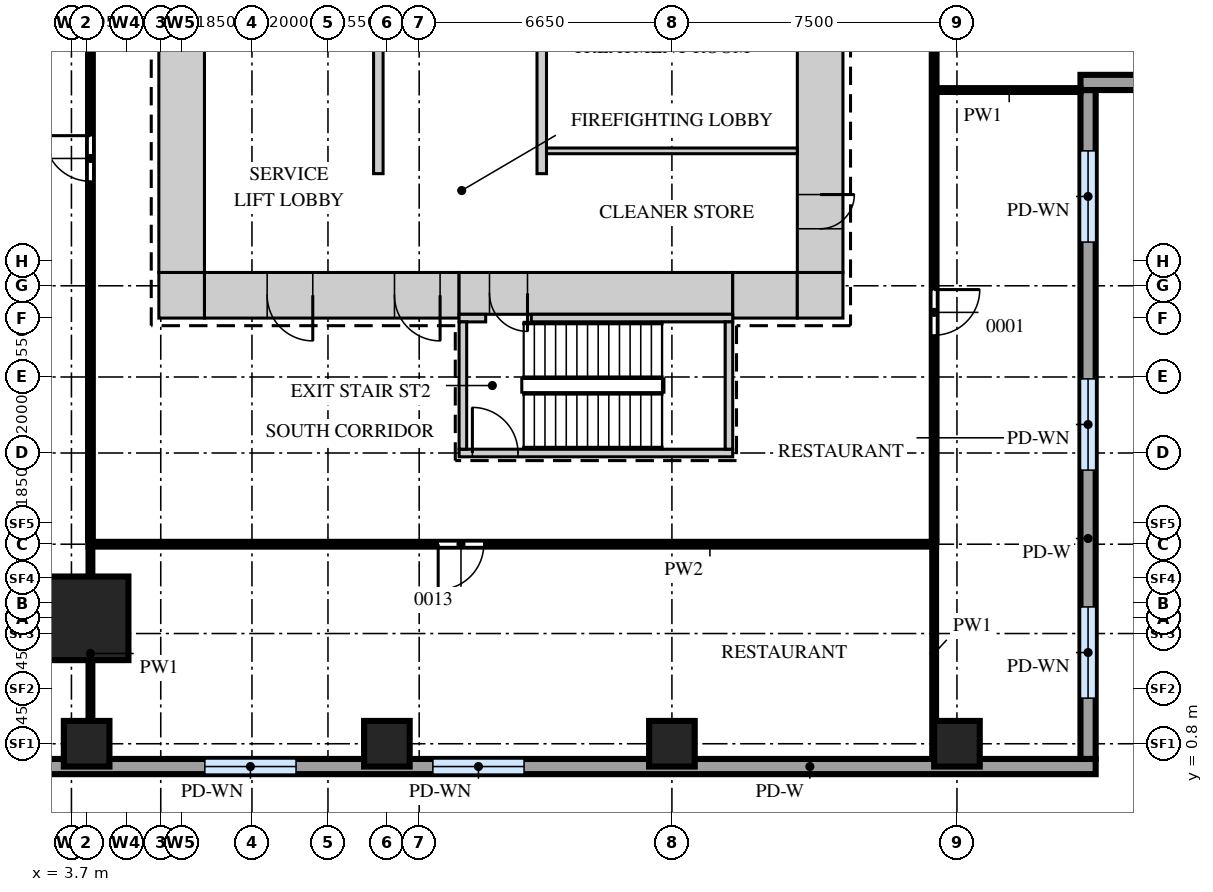
"""IFC4 building model, lengths in metres.
Left out: names, types, materials, properties, quantities, classifications, styles, units other than length and angle.
Written with IfcOpenShell. Run it as: python <this file> out.ifc"""

import sys

from ifc_helpers import new_model, si_unit, direction, frame, frame_2d, origin, origin_2d, place, context, subcontext, project, spatial, rectangle, extrude, source, transform, mapped, element, fill, save


model = new_model("IFC4")
c1 = context("Model", 3, precision=1e-05, world=origin(), true_north=direction((0.0, 1.0)))
c2 = subcontext(c1, "Body", "Model", "MODEL_VIEW")
j1 = project(units=[si_unit("LENGTHUNIT", "METRE"), si_unit("PLANEANGLEUNIT", "RADIAN")], contexts=[c1])
p1 = place(None, origin())
s1 = spatial("IfcSite", under=j1, at=p1, CompositionType="ELEMENT")
p2 = place(p1, origin())
s2 = spatial("IfcBuilding", under=s1, at=p2, CompositionType="ELEMENT")
p3 = place(p2, frame((0.0, 0.0, 18.5)))
s3 = spatial("IfcBuildingStorey", under=s2, at=p3, CompositionType="ELEMENT", Elevation=18.5)
m1 = source(origin(), c2, "Body", "SweptSolid", [
    extrude(rectangle(XDim=6.7, YDim=1.2, at=frame_2d((3.35, 0.0))), origin(), (0.0, 0.0, 1.0), 4.7),
])
p4 = place(p3, frame((7.2, 12.6, 0.0), z_axis=(0.0, 0.0, 1.0), x_axis=(1.0, 0.0, 0.0)))
e1 = element("IfcWall", 1, at=p4, inside=s3, PredefinedType="SHEAR", context=c2, shape_type="MappedRepresentation", body=[
    mapped(m1, transform((0.0, 0.0, 0.0))),
])
m2 = source(origin(), c2, "Body", "SweptSolid", [
    extrude(rectangle(XDim=1.2, YDim=2.1, at=frame_2d((0.6, 1.05))), frame((0.0, 0.61, 0.0), z_axis=(0.0, -1.0, 0.0), x_axis=(1.0, 0.0, 0.0)), (0.0, 0.0, 1.0), 1.22),
])
p5 = place(p4, frame((5.0, 0.0, 0.0)))
e2 = element("IfcOpeningElement", 2, at=p5, cuts=e1, PredefinedType="OPENING", context=c2, shape_type="MappedRepresentation", body=[
    mapped(m2, transform((0.0, 0.0, 0.0))),
])
p6 = place(p4, frame((1.65, 0.0, 0.0)))
e3 = element("IfcOpeningElement", 3, at=p6, cuts=e1, PredefinedType="OPENING", context=c2, shape_type="MappedRepresentation", body=[
    mapped(m2, transform((0.0, 0.0, 0.0))),
])
m3 = source(origin(), c2, "Body", "SweptSolid", [
    extrude(rectangle(XDim=7.2, YDim=1.1, at=frame_2d((3.6, 0.0))), origin(), (0.0, 0.0, 1.0), 4.7),
])
p7 = place(p3, frame((13.9, 12.65, 0.0), z_axis=(0.0, 0.0, 1.0), x_axis=(1.0, 0.0, 0.0)))
e4 = element("IfcWall", 4, at=p7, inside=s3, PredefinedType="SHEAR", context=c2, shape_type="MappedRepresentation", body=[
    mapped(m3, transform((0.0, 0.0, 0.0))),
])
m4 = source(origin(), c2, "Body", "SweptSolid", [
    extrude(rectangle(XDim=1.0, YDim=2.1, at=frame_2d((0.5, 1.05))), frame((0.0, 0.56, 0.0), z_axis=(0.0, -1.0, 0.0), x_axis=(1.0, 0.0, 0.0)), (0.0, 0.0, 1.0), 1.12),
])
p8 = place(p7, frame((0.8, 0.0, 0.0)))
e5 = element("IfcOpeningElement", 5, at=p8, cuts=e4, PredefinedType="OPENING", context=c2, shape_type="MappedRepresentation", body=[
    mapped(m4, transform((0.0, 0.0, 0.0))),
])
m5 = source(origin(), c2, "Body", "SweptSolid", [
    extrude(rectangle(XDim=1.7, YDim=1.2, at=frame_2d((0.85, 0.0))), origin(), (0.0, 0.0, 1.0), 4.7),
])
p9 = place(p3, frame((21.1, 12.6, 0.0), z_axis=(0.0, 0.0, 1.0), x_axis=(1.0, 0.0, 0.0)))
e6 = element("IfcWall", 6, at=p9, inside=s3, PredefinedType="SHEAR", context=c2, shape_type="MappedRepresentation", body=[
    mapped(m5, transform((0.0, 0.0, 0.0))),
])
m6 = source(origin(), c2, "Body", "SweptSolid", [
    extrude(rectangle(XDim=1.2, YDim=1.2, at=frame_2d((0.6, 0.0))), origin(), (0.0, 0.0, 1.0), 4.7),
])
for number, where, z_axis, x_axis in (
    (7, (22.8, 12.6, 0.0), (0.0, 0.0, 1.0), (1.0, 0.0, 0.0)),
    (8, (6.0, 12.6, 0.0), (0.0, 0.0, 1.0), (1.0, 0.0, 0.0)),
):
    element("IfcWall", number, at=place(p3, frame(where, z_axis=z_axis, x_axis=x_axis)), inside=s3, PredefinedType="SHEAR", context=c2, shape_type="MappedRepresentation", body=[
        mapped(m6, transform((0.0, 0.0, 0.0))),
    ])
m7 = source(origin(), c2, "Body", "SweptSolid", [
    extrude(rectangle(XDim=27.6, YDim=1.2, at=frame_2d((13.8, 0.0))), origin(), (0.0, 0.0, 1.0), 4.7),
])
p10 = place(p3, frame((23.4, 13.2, 0.0), z_axis=(0.0, 0.0, 1.0), x_axis=(0.0, 1.0, 0.0)))
e9 = element("IfcWall", 9, at=p10, inside=s3, PredefinedType="SHEAR", context=c2, shape_type="MappedRepresentation", body=[
    mapped(m7, transform((0.0, 0.0, 0.0))),
])
m8 = source(origin(), c2, "Body", "SweptSolid", [
    extrude(rectangle(XDim=1.8, YDim=2.1, at=frame_2d((0.9, 1.05))), frame((0.0, 0.61, 0.0), z_axis=(0.0, -1.0, 0.0), x_axis=(1.0, 0.0, 0.0)), (0.0, 0.0, 1.0), 1.22),
])
p11 = place(p10, frame((22.4, 0.0, 0.0)))
e10 = element("IfcOpeningElement", 10, at=p11, cuts=e9, PredefinedType="OPENING", context=c2, shape_type="MappedRepresentation", body=[
    mapped(m8, transform((0.0, 0.0, 0.0))),
])
p12 = place(p10, frame((14.4, 0.0, 0.0)))
e11 = element("IfcOpeningElement", 11, at=p12, cuts=e9, PredefinedType="OPENING", context=c2, shape_type="MappedRepresentation", body=[
    mapped(m2, transform((0.0, 0.0, 0.0))),
])
m9 = source(origin(), c2, "Body", "SweptSolid", [
    extrude(rectangle(XDim=0.9, YDim=2.1, at=frame_2d((0.45, 1.05))), frame((0.0, 0.61, 0.0), z_axis=(0.0, -1.0, 0.0), x_axis=(1.0, 0.0, 0.0)), (0.0, 0.0, 1.0), 1.22),
])
p13 = place(p10, frame((1.15, 0.0, 0.0)))
e12 = element("IfcOpeningElement", 12, at=p13, cuts=e9, PredefinedType="OPENING", context=c2, shape_type="MappedRepresentation", body=[
    mapped(m9, transform((0.0, 0.0, 0.0))),
])
p14 = place(p10, frame((6.0, 0.0, 0.0)))
e13 = element("IfcOpeningElement", 13, at=p14, cuts=e9, PredefinedType="OPENING", context=c2, shape_type="MappedRepresentation", body=[
    mapped(m9, transform((0.0, 0.0, 0.0))),
])
p15 = place(p3, frame((6.6, 13.2, 0.0), z_axis=(0.0, 0.0, 1.0), x_axis=(0.0, 1.0, 0.0)))
e14 = element("IfcWall", 14, at=p15, inside=s3, PredefinedType="SHEAR", context=c2, shape_type="MappedRepresentation", body=[
    mapped(m7, transform((0.0, 0.0, 0.0))),
])
m10 = source(origin(), c2, "Body", "SweptSolid", [
    extrude(rectangle(XDim=0.7, YDim=0.2, at=frame_2d((0.35, 0.0))), origin(), (0.0, 0.0, 1.0), 4.7),
])
p16 = place(p3, frame((13.9, 12.0, 0.0), z_axis=(0.0, 0.0, 1.0), x_axis=(1.0, 0.0, 0.0)))
e15 = element("IfcWall", 15, at=p16, inside=s3, PredefinedType="SHEAR", context=c2, shape_type="MappedRepresentation", body=[
    mapped(m10, transform((0.0, 0.0, 0.0))),
])
m11 = source(origin(), c2, "Body", "SweptSolid", [
    extrude(rectangle(XDim=5.3, YDim=0.2, at=frame_2d((2.65, 0.0))), origin(), (0.0, 0.0, 1.0), 4.7),
])
p17 = place(p3, frame((15.8, 12.0, 0.0), z_axis=(0.0, 0.0, 1.0), x_axis=(1.0, 0.0, 0.0)))
e16 = element("IfcWall", 16, at=p17, inside=s3, PredefinedType="SHEAR", context=c2, shape_type="MappedRepresentation", body=[
    mapped(m11, transform((0.0, 0.0, 0.0))),
])
m12 = source(origin(), c2, "Body", "SweptSolid", [
    extrude(rectangle(XDim=7.2, YDim=0.2, at=frame_2d((3.6, 0.0))), origin(), (0.0, 0.0, 1.0), 4.7),
])
p18 = place(p3, frame((13.9, 8.45, 0.0), z_axis=(0.0, 0.0, 1.0), x_axis=(1.0, 0.0, 0.0)))
e17 = element("IfcWall", 17, at=p18, inside=s3, PredefinedType="SHEAR", context=c2, shape_type="MappedRepresentation", body=[
    mapped(m12, transform((0.0, 0.0, 0.0))),
])
m13 = source(origin(), c2, "Body", "SweptSolid", [
    extrude(rectangle(XDim=1.2, YDim=2.1, at=frame_2d((0.6, 1.05))), frame((0.0, 0.11, 0.0), z_axis=(0.0, -1.0, 0.0), x_axis=(1.0, 0.0, 0.0)), (0.0, 0.0, 1.0), 0.22),
])
p19 = place(p18, frame((0.35, 0.0, 0.0)))
e18 = element("IfcOpeningElement", 18, at=p19, cuts=e17, PredefinedType="OPENING", context=c2, shape_type="MappedRepresentation", body=[
    mapped(m13, transform((0.0, 0.0, 0.0))),
])
m14 = source(origin(), c2, "Body", "SweptSolid", [
    extrude(rectangle(XDim=3.35, YDim=0.2, at=frame_2d((1.675, 0.0))), origin(), (0.0, 0.0, 1.0), 4.7),
])
for number, where, z_axis, x_axis in (
    (19, (21.0, 8.55, 0.0), (0.0, 0.0, 1.0), (0.0, 1.0, 0.0)),
    (20, (14.0, 8.55, 0.0), (0.0, 0.0, 1.0), (0.0, 1.0, 0.0)),
):
    element("IfcWall", number, at=place(p3, frame(where, z_axis=z_axis, x_axis=x_axis)), inside=s3, PredefinedType="SHEAR", context=c2, shape_type="MappedRepresentation", body=[
        mapped(m14, transform((0.0, 0.0, 0.0))),
    ])
m15 = source(origin(), c2, "Body", "SweptSolid", [
    extrude(rectangle(XDim=3.4, YDim=0.25, at=frame_2d((1.7, 0.0))), origin(), (0.0, 0.0, 1.0), 4.7),
])
for number, where, z_axis, x_axis in (
    (21, (16.075, 15.8, 0.0), (0.0, 0.0, 1.0), (0.0, 1.0, 0.0)),
    (22, (11.775, 15.8, 0.0), (0.0, 0.0, 1.0), (0.0, 1.0, 0.0)),
):
    element("IfcWall", number, at=place(p3, frame(where, z_axis=z_axis, x_axis=x_axis)), inside=s3, PredefinedType="STANDARD", context=c2, shape_type="MappedRepresentation", body=[
        mapped(m15, transform((0.0, 0.0, 0.0))),
    ])
m16 = source(origin(), c2, "Body", "SweptSolid", [
    extrude(rectangle(XDim=2.2, YDim=2.2, at=origin_2d()), origin(), (0.0, 0.0, 1.0), 4.7),
])
p20 = place(p3, frame((4.1, 4.1, 0.0), z_axis=(0.0, 0.0, 1.0), x_axis=(1.0, 0.0, 0.0)))
e23 = element("IfcColumn", 23, at=p20, inside=s3, PredefinedType="COLUMN", context=c2, shape_type="MappedRepresentation", body=[
    mapped(m16, transform((0.0, 0.0, 0.0))),
])
m17 = source(origin(), c2, "Body", "SweptSolid", [
    extrude(rectangle(XDim=1.2, YDim=1.2, at=origin_2d()), origin(), (0.0, 0.0, 1.0), 4.7),
])
for number, where, z_axis, x_axis in (
    (24, (4.1, 0.8, 0.0), (0.0, 0.0, 1.0), (1.0, 0.0, 0.0)),
    (25, (12.0, 0.8, 0.0), (0.0, 0.0, 1.0), (1.0, 0.0, 0.0)),
    (26, (19.5, 0.8, 0.0), (0.0, 0.0, 1.0), (1.0, 0.0, 0.0)),
    (27, (27.0, 0.8, 0.0), (0.0, 0.0, 1.0), (1.0, 0.0, 0.0)),
):
    element("IfcColumn", number, at=place(p3, frame(where, z_axis=z_axis, x_axis=x_axis)), inside=s3, PredefinedType="COLUMN", context=c2, shape_type="MappedRepresentation", body=[
        mapped(m17, transform((0.0, 0.0, 0.0))),
    ])
m18 = source(origin(), c2, "Body", "SweptSolid", [
    extrude(rectangle(XDim=32.44, YDim=0.4, at=frame_2d((16.22, 0.0))), origin(), (0.0, 0.0, 1.0), 4.7),
])
p21 = place(p3, frame((-1.79, 0.2, 0.0), z_axis=(0.0, 0.0, 1.0), x_axis=(1.0, 0.0, 0.0)))
e28 = element("IfcWall", 28, at=p21, inside=s3, PredefinedType="SOLIDWALL", context=c2, shape_type="MappedRepresentation", body=[
    mapped(m18, transform((0.0, 0.0, 0.0))),
])
m19 = source(origin(), c2, "Body", "SweptSolid", [
    extrude(rectangle(XDim=2.4, YDim=2.4, at=frame_2d((1.2, 1.2))), frame((0.0, 0.21, 0.0), z_axis=(0.0, -1.0, 0.0), x_axis=(1.0, 0.0, 0.0)), (0.0, 0.0, 1.0), 0.42),
])
p22 = place(p21, frame((9.0, 0.0, 1.0)))
e29 = element("IfcOpeningElement", 29, at=p22, cuts=e28, PredefinedType="OPENING", context=c2, shape_type="MappedRepresentation", body=[
    mapped(m19, transform((0.0, 0.0, 0.0))),
])
p23 = place(p21, frame((15.0, 0.0, 1.0)))
e30 = element("IfcOpeningElement", 30, at=p23, cuts=e28, PredefinedType="OPENING", context=c2, shape_type="MappedRepresentation", body=[
    mapped(m19, transform((0.0, 0.0, 0.0))),
])
m20 = source(origin(), c2, "Body", "SweptSolid", [
    extrude(rectangle(XDim=17.6, YDim=0.4, at=frame_2d((8.8, 0.0))), origin(), (0.0, 0.0, 1.0), 4.7),
])
p24 = place(p3, frame((30.45, 0.4, 0.0), z_axis=(0.0, 0.0, 1.0), x_axis=(0.0, 1.0, 0.0)))
e31 = element("IfcWall", 31, at=p24, inside=s3, PredefinedType="SOLIDWALL", context=c2, shape_type="MappedRepresentation", body=[
    mapped(m20, transform((0.0, 0.0, 0.0))),
])
p25 = place(p24, frame((1.6, 0.0, 1.0)))
e32 = element("IfcOpeningElement", 32, at=p25, cuts=e31, PredefinedType="OPENING", context=c2, shape_type="MappedRepresentation", body=[
    mapped(m19, transform((0.0, 0.0, 0.0))),
])
p26 = place(p24, frame((7.6, 0.0, 1.0)))
e33 = element("IfcOpeningElement", 33, at=p26, cuts=e31, PredefinedType="OPENING", context=c2, shape_type="MappedRepresentation", body=[
    mapped(m19, transform((0.0, 0.0, 0.0))),
])
p27 = place(p24, frame((13.6, 0.0, 1.0)))
e34 = element("IfcOpeningElement", 34, at=p27, cuts=e31, PredefinedType="OPENING", context=c2, shape_type="MappedRepresentation", body=[
    mapped(m19, transform((0.0, 0.0, 0.0))),
])
m21 = source(origin(), c2, "Body", "SweptSolid", [
    extrude(rectangle(XDim=11.1, YDim=0.4, at=frame_2d((5.55, 0.0))), origin(), (0.0, 0.0, 1.0), 4.7),
])
p28 = place(p3, frame((30.25, 18.2, 0.0), z_axis=(0.0, 0.0, 1.0), x_axis=(1.0, 0.0, 0.0)))
e35 = element("IfcWall", 35, at=p28, inside=s3, PredefinedType="SOLIDWALL", context=c2, shape_type="MappedRepresentation", body=[
    mapped(m21, transform((0.0, 0.0, 0.0))),
])
p29 = place(p28, frame((4.35, 0.0, 1.0)))
e36 = element("IfcOpeningElement", 36, at=p29, cuts=e35, PredefinedType="OPENING", context=c2, shape_type="MappedRepresentation", body=[
    mapped(m19, transform((0.0, 0.0, 0.0))),
])
m22 = source(origin(), c2, "Body", "SweptSolid", [
    extrude(rectangle(XDim=5.55, YDim=0.1, at=frame_2d((2.775, 0.0))), origin(), (0.0, 0.0, 1.0), 4.7),
])
for number, where, z_axis, x_axis in (
    (37, (4.2, 0.4, 0.0), (0.0, 0.0, 1.0), (0.0, 1.0, 0.0)),
    (38, (26.4, 0.4, 0.0), (0.0, 0.0, 1.0), (0.0, 1.0, 0.0)),
):
    element("IfcWall", number, at=place(p3, frame(where, z_axis=z_axis, x_axis=x_axis)), inside=s3, PredefinedType="PARTITIONING", context=c2, shape_type="MappedRepresentation", body=[
        mapped(m22, transform((0.0, 0.0, 0.0))),
    ])
m23 = source(origin(), c2, "Body", "SweptSolid", [
    extrude(rectangle(XDim=22.3, YDim=0.125, at=frame_2d((11.15, 0.0))), origin(), (0.0, 0.0, 1.0), 4.7),
])
p30 = place(p3, frame((4.15, 6.05, 0.0), z_axis=(0.0, 0.0, 1.0), x_axis=(1.0, 0.0, 0.0)))
e39 = element("IfcWall", 39, at=p30, inside=s3, PredefinedType="PARTITIONING", context=c2, shape_type="MappedRepresentation", body=[
    mapped(m23, transform((0.0, 0.0, 0.0))),
])
m24 = source(origin(), c2, "Body", "SweptSolid", [
    extrude(rectangle(XDim=1.2, YDim=2.1, at=frame_2d((0.6, 1.05))), frame((0.0, 0.073, 0.0), z_axis=(0.0, -1.0, 0.0), x_axis=(1.0, 0.0, 0.0)), (0.0, 0.0, 1.0), 0.145),
])
p31 = place(p30, frame((9.2, 0.0, 0.0)))
e40 = element("IfcOpeningElement", 40, at=p31, cuts=e39, PredefinedType="OPENING", context=c2, shape_type="MappedRepresentation", body=[
    mapped(m24, transform((0.0, 0.0, 0.0))),
])
m25 = source(origin(), c2, "Body", "SweptSolid", [
    extrude(rectangle(XDim=41.8, YDim=0.125, at=frame_2d((20.9, 0.0))), origin(), (0.0, 0.0, 1.0), 4.7),
])
p32 = place(p3, frame((4.2, 6.15, 0.0), z_axis=(0.0, 0.0, 1.0), x_axis=(0.0, 1.0, 0.0)))
e41 = element("IfcWall", 41, at=p32, inside=s3, PredefinedType="PARTITIONING", context=c2, shape_type="MappedRepresentation", body=[
    mapped(m25, transform((0.0, 0.0, 0.0))),
])
p33 = place(p32, frame((9.45, 0.0, 0.0)))
e42 = element("IfcOpeningElement", 42, at=p33, cuts=e41, PredefinedType="OPENING", context=c2, shape_type="MappedRepresentation", body=[
    mapped(m24, transform((0.0, 0.0, 0.0))),
])
p34 = place(p32, frame((28.05, 0.0, 0.0)))
e43 = element("IfcOpeningElement", 43, at=p34, cuts=e41, PredefinedType="OPENING", context=c2, shape_type="MappedRepresentation", body=[
    mapped(m24, transform((0.0, 0.0, 0.0))),
])
m26 = source(origin(), c2, "Body", "SweptSolid", [
    extrude(rectangle(XDim=27.15, YDim=0.125, at=frame_2d((13.575, 0.0))), origin(), (0.0, 0.0, 1.0), 4.7),
])
p35 = place(p3, frame((26.4, 6.15, 0.0), z_axis=(0.0, 0.0, 1.0), x_axis=(0.0, 1.0, 0.0)))
e44 = element("IfcWall", 44, at=p35, inside=s3, PredefinedType="PARTITIONING", context=c2, shape_type="MappedRepresentation", body=[
    mapped(m26, transform((0.0, 0.0, 0.0))),
])
p36 = place(p35, frame((5.4, 0.0, 0.0)))
e45 = element("IfcOpeningElement", 45, at=p36, cuts=e44, PredefinedType="OPENING", context=c2, shape_type="MappedRepresentation", body=[
    mapped(m24, transform((0.0, 0.0, 0.0))),
])
p37 = place(p35, frame((13.25, 0.0, 0.0)))
e46 = element("IfcOpeningElement", 46, at=p37, cuts=e44, PredefinedType="OPENING", context=c2, shape_type="MappedRepresentation", body=[
    mapped(m24, transform((0.0, 0.0, 0.0))),
])
m27 = source(origin(), c2, "Body", "SweptSolid", [
    extrude(rectangle(XDim=6.6, YDim=0.15, at=frame_2d((3.3, 0.0))), origin(), (0.0, 0.0, 1.0), 4.7),
])
p38 = place(p3, frame((16.2, 16.4, 0.0), z_axis=(0.0, 0.0, 1.0), x_axis=(1.0, 0.0, 0.0)))
e47 = element("IfcWall", 47, at=p38, inside=s3, PredefinedType="PARTITIONING", context=c2, shape_type="MappedRepresentation", body=[
    mapped(m27, transform((0.0, 0.0, 0.0))),
])
m28 = source(origin(), c2, "Body", "SweptSolid", [
    extrude(rectangle(XDim=3.75, YDim=0.1, at=frame_2d((1.875, 0.0))), origin(), (0.0, 0.0, 1.0), 4.7),
])
p39 = place(p3, frame((26.5, 18.0, 0.0), z_axis=(0.0, 0.0, 1.0), x_axis=(1.0, 0.0, 0.0)))
e48 = element("IfcWall", 48, at=p39, inside=s3, PredefinedType="PARTITIONING", context=c2, shape_type="MappedRepresentation", body=[
    mapped(m28, transform((0.0, 0.0, 0.0))),
])
m29 = source(origin(), c2, "Body", "SweptSolid", [
    extrude(rectangle(XDim=2.4, YDim=2.4, at=frame_2d((1.2, 1.2))), frame((0.0, 0.03, 0.0), z_axis=(0.0, -1.0, 0.0), x_axis=(1.0, 0.0, 0.0)), (0.0, 0.0, 1.0), 0.06),
])
p40 = place(p22, origin())
e49 = element("IfcWindow", 49, at=p40, inside=s3, PartitioningType="SINGLE_PANEL", PredefinedType="WINDOW", context=c2, shape_type="MappedRepresentation", body=[
    mapped(m29, transform((0.0, 0.0, 0.0))),
])
fill(e29, e49)
p41 = place(p23, origin())
e50 = element("IfcWindow", 50, at=p41, inside=s3, PartitioningType="SINGLE_PANEL", PredefinedType="WINDOW", context=c2, shape_type="MappedRepresentation", body=[
    mapped(m29, transform((0.0, 0.0, 0.0))),
])
fill(e30, e50)
p42 = place(p25, origin())
e51 = element("IfcWindow", 51, at=p42, inside=s3, PartitioningType="SINGLE_PANEL", PredefinedType="WINDOW", context=c2, shape_type="MappedRepresentation", body=[
    mapped(m29, transform((0.0, 0.0, 0.0))),
])
fill(e32, e51)
p43 = place(p26, origin())
e52 = element("IfcWindow", 52, at=p43, inside=s3, PartitioningType="SINGLE_PANEL", PredefinedType="WINDOW", context=c2, shape_type="MappedRepresentation", body=[
    mapped(m29, transform((0.0, 0.0, 0.0))),
])
fill(e33, e52)
p44 = place(p27, origin())
e53 = element("IfcWindow", 53, at=p44, inside=s3, PartitioningType="SINGLE_PANEL", PredefinedType="WINDOW", context=c2, shape_type="MappedRepresentation", body=[
    mapped(m29, transform((0.0, 0.0, 0.0))),
])
fill(e34, e53)
m30 = source(origin(), c2, "Body", "SweptSolid", [
    extrude(rectangle(XDim=0.9, YDim=2.1, at=frame_2d((0.45, 1.05))), frame((0.0, 0.55, 0.0), z_axis=(0.0, -1.0, 0.0), x_axis=(1.0, 0.0, 0.0)), (0.0, 0.0, 1.0), 1.1),
])
p45 = place(p13, origin())
e54 = element("IfcDoor", 54, at=p45, inside=s3, OperationType="SINGLE_SWING_RIGHT", PredefinedType="DOOR", context=c2, shape_type="MappedRepresentation", body=[
    mapped(m30, transform((0.0, 0.0, 0.0))),
])
fill(e12, e54)
m31 = source(origin(), c2, "Body", "SweptSolid", [
    extrude(rectangle(XDim=1.2, YDim=2.1, at=frame_2d((0.6, 1.05))), frame((0.0, 0.55, 0.0), z_axis=(0.0, -1.0, 0.0), x_axis=(1.0, 0.0, 0.0)), (0.0, 0.0, 1.0), 1.1),
])
p46 = place(p5, origin())
e55 = element("IfcDoor", 55, at=p46, inside=s3, OperationType="SINGLE_SWING_RIGHT", PredefinedType="DOOR", context=c2, shape_type="MappedRepresentation", body=[
    mapped(m31, transform((0.0, 0.0, 0.0))),
])
fill(e2, e55)
p47 = place(p6, origin())
e56 = element("IfcDoor", 56, at=p47, inside=s3, OperationType="SINGLE_SWING_RIGHT", PredefinedType="DOOR", context=c2, shape_type="MappedRepresentation", body=[
    mapped(m31, transform((0.0, 0.0, 0.0))),
])
fill(e3, e56)
m32 = source(origin(), c2, "Body", "SweptSolid", [
    extrude(rectangle(XDim=1.0, YDim=2.1, at=frame_2d((0.5, 1.05))), frame((0.0, 0.5, 0.0), z_axis=(0.0, -1.0, 0.0), x_axis=(1.0, 0.0, 0.0)), (0.0, 0.0, 1.0), 1.0),
])
p48 = place(p8, origin())
e57 = element("IfcDoor", 57, at=p48, inside=s3, OperationType="SINGLE_SWING_RIGHT", PredefinedType="DOOR", context=c2, shape_type="MappedRepresentation", body=[
    mapped(m32, transform((0.0, 0.0, 0.0))),
])
fill(e5, e57)
m33 = source(origin(), c2, "Body", "SweptSolid", [
    extrude(rectangle(XDim=1.2, YDim=2.1, at=frame_2d((0.6, 1.05))), frame((0.0, 0.025, 0.0), z_axis=(0.0, -1.0, 0.0), x_axis=(1.0, 0.0, 0.0)), (0.0, 0.0, 1.0), 0.05),
])
p49 = place(p36, origin())
e58 = element("IfcDoor", 58, at=p49, inside=s3, OperationType="SINGLE_SWING_RIGHT", PredefinedType="DOOR", context=c2, shape_type="MappedRepresentation", body=[
    mapped(m33, transform((0.0, 0.0, 0.0))),
])
fill(e45, e58)
p50 = place(p31, origin())
e59 = element("IfcDoor", 59, at=p50, inside=s3, OperationType="SINGLE_SWING_LEFT", PredefinedType="DOOR", context=c2, shape_type="MappedRepresentation", body=[
    mapped(m33, transform((0.0, 0.0, 0.0))),
])
fill(e40, e59)
p51 = place(p33, origin())
e60 = element("IfcDoor", 60, at=p51, inside=s3, OperationType="SINGLE_SWING_LEFT", PredefinedType="DOOR", context=c2, shape_type="MappedRepresentation", body=[
    mapped(m33, transform((0.0, 0.0, 0.0))),
])
fill(e42, e60)
p52 = place(p19, origin())
e61 = element("IfcDoor", 61, at=p52, inside=s3, OperationType="SINGLE_SWING_RIGHT", PredefinedType="DOOR", context=c2, shape_type="MappedRepresentation", body=[
    mapped(m33, transform((0.0, 0.0, 0.0))),
])
fill(e18, e61)
save(model, sys.argv[1])
